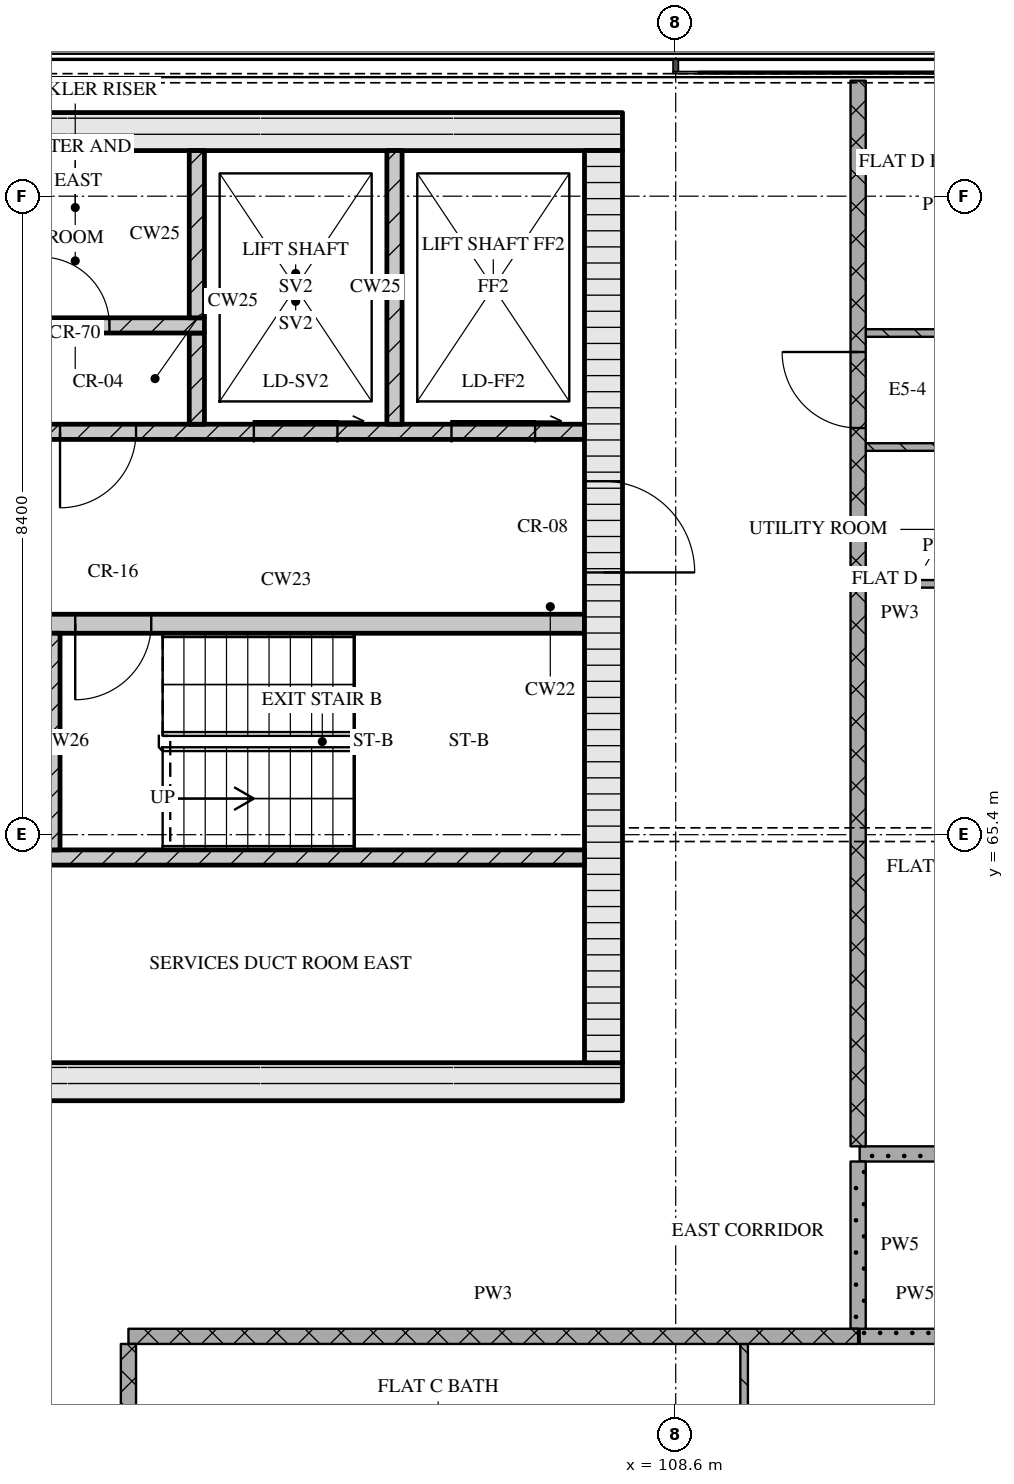
"""IFC4 building model, lengths in metres.
Left out: names, types, materials, properties, quantities, classifications, styles, units other than length and angle.
Written with IfcOpenShell. Run it as: python <this file> out.ifc"""

import sys

from ifc_helpers import new_model, si_unit, direction, frame, frame_2d, origin, place, context, subcontext, project, spatial, rectangle, extrude, element, fill, save


model = new_model("IFC4")
c1 = context("Model", 3, precision=1e-05, world=origin(), true_north=direction((0.0, 1.0)))
c2 = subcontext(c1, "Body", "Model", "MODEL_VIEW")
j1 = project(units=[si_unit("LENGTHUNIT", "METRE"), si_unit("PLANEANGLEUNIT", "RADIAN")], contexts=[c1])
p1 = place(None, origin())
s1 = spatial("IfcSite", under=j1, at=p1, CompositionType="ELEMENT")
p2 = place(p1, origin())
s2 = spatial("IfcBuilding", under=s1, at=p2, CompositionType="ELEMENT")
p3 = place(p2, frame((0.0, 0.0, 292.35)))
s3 = spatial("IfcBuildingStorey", under=s2, at=p3, CompositionType="ELEMENT", Elevation=292.35)
p4 = place(p3, frame((67.3, 62.15, 0.0), z_axis=(0.0, 0.0, 1.0), x_axis=(1.0, 0.0, 0.0)))
e1 = element("IfcWall", 1, at=p4, inside=s3, PredefinedType="SOLIDWALL", context=c2, shape_type="SweptSolid", body=[
    extrude(rectangle(XDim=40.6, YDim=0.5, at=frame_2d((20.3, 0.0))), origin(), (0.0, 0.0, 1.0), 3.32),
])
p5 = place(p4, frame((20.65, 0.0, 0.0)))
e2 = element("IfcOpeningElement", 2, at=p5, cuts=e1, PredefinedType="OPENING", context=c2, shape_type="SweptSolid", body=[
    extrude(rectangle(XDim=1.8, YDim=2.1, at=frame_2d((0.9, 1.05))), frame((0.0, 0.26, 0.0), z_axis=(0.0, -1.0, 0.0), x_axis=(1.0, 0.0, 0.0)), (0.0, 0.0, 1.0), 0.52),
])
p6 = place(p3, frame((67.3, 74.65, 0.0), z_axis=(0.0, 0.0, 1.0), x_axis=(1.0, 0.0, 0.0)))
e3 = element("IfcWall", 3, at=p6, inside=s3, PredefinedType="SOLIDWALL", context=c2, shape_type="SweptSolid", body=[
    extrude(rectangle(XDim=40.6, YDim=0.5, at=frame_2d((20.3, 0.0))), origin(), (0.0, 0.0, 1.0), 3.32),
])
p7 = place(p3, frame((107.65, 62.4, 0.0), z_axis=(0.0, 0.0, 1.0), x_axis=(0.0, 1.0, 0.0)))
e4 = element("IfcWall", 4, at=p7, inside=s3, PredefinedType="SOLIDWALL", context=c2, shape_type="SweptSolid", body=[
    extrude(rectangle(XDim=12.0, YDim=0.5, at=frame_2d((6.0, 0.0))), origin(), (0.0, 0.0, 1.0), 3.32),
])
p8 = place(p7, frame((6.45, 0.0, 0.0)))
e5 = element("IfcOpeningElement", 5, at=p8, cuts=e4, PredefinedType="OPENING", context=c2, shape_type="SweptSolid", body=[
    extrude(rectangle(XDim=1.2, YDim=2.1, at=frame_2d((0.6, 1.05))), frame((0.0, 0.26, 0.0), z_axis=(0.0, -1.0, 0.0), x_axis=(1.0, 0.0, 0.0)), (0.0, 0.0, 1.0), 0.52),
])
p9 = place(p3, frame((91.4, 65.1, 0.0), z_axis=(0.0, 0.0, 1.0), x_axis=(1.0, 0.0, 0.0)))
e6 = element("IfcWall", 6, at=p9, inside=s3, PredefinedType="SOLIDWALL", context=c2, shape_type="SweptSolid", body=[
    extrude(rectangle(XDim=16.0, YDim=0.2, at=frame_2d((8.0, 0.0))), origin(), (0.0, 0.0, 1.0), 3.32),
])
p10 = place(p9, frame((0.85, 0.0, 0.0)))
e7 = element("IfcOpeningElement", 7, at=p10, cuts=e6, PredefinedType="OPENING", context=c2, shape_type="SweptSolid", body=[
    extrude(rectangle(XDim=1.1, YDim=2.1, at=frame_2d((0.55, 1.05))), frame((0.0, 0.11, 0.0), z_axis=(0.0, -1.0, 0.0), x_axis=(1.0, 0.0, 0.0)), (0.0, 0.0, 1.0), 0.22),
])
p11 = place(p9, frame((3.35, 0.0, 0.0)))
e8 = element("IfcOpeningElement", 8, at=p11, cuts=e6, PredefinedType="OPENING", context=c2, shape_type="SweptSolid", body=[
    extrude(rectangle(XDim=1.1, YDim=2.1, at=frame_2d((0.55, 1.05))), frame((0.0, 0.11, 0.0), z_axis=(0.0, -1.0, 0.0), x_axis=(1.0, 0.0, 0.0)), (0.0, 0.0, 1.0), 0.22),
])
p12 = place(p9, frame((5.85, 0.0, 0.0)))
e9 = element("IfcOpeningElement", 9, at=p12, cuts=e6, PredefinedType="OPENING", context=c2, shape_type="SweptSolid", body=[
    extrude(rectangle(XDim=1.1, YDim=2.1, at=frame_2d((0.55, 1.05))), frame((0.0, 0.11, 0.0), z_axis=(0.0, -1.0, 0.0), x_axis=(1.0, 0.0, 0.0)), (0.0, 0.0, 1.0), 0.22),
])
p13 = place(p9, frame((7.83, 0.0, 0.0)))
e10 = element("IfcOpeningElement", 10, at=p13, cuts=e6, PredefinedType="OPENING", context=c2, shape_type="SweptSolid", body=[
    extrude(rectangle(XDim=0.9, YDim=2.1, at=frame_2d((0.45, 1.05))), frame((0.0, 0.11, 0.0), z_axis=(0.0, -1.0, 0.0), x_axis=(1.0, 0.0, 0.0)), (0.0, 0.0, 1.0), 0.22),
])
p14 = place(p3, frame((100.35, 65.2, 0.0), z_axis=(0.0, 0.0, 1.0), x_axis=(0.0, 1.0, 0.0)))
e11 = element("IfcWall", 11, at=p14, inside=s3, PredefinedType="SOLIDWALL", context=c2, shape_type="SweptSolid", body=[
    extrude(rectangle(XDim=2.85, YDim=0.3, at=frame_2d((1.425, 0.0))), origin(), (0.0, 0.0, 1.0), 3.32),
])
p15 = place(p3, frame((98.95, 68.175, 0.0), z_axis=(0.0, 0.0, 1.0), x_axis=(1.0, 0.0, 0.0)))
e12 = element("IfcWall", 12, at=p15, inside=s3, PredefinedType="SOLIDWALL", context=c2, shape_type="SweptSolid", body=[
    extrude(rectangle(XDim=8.45, YDim=0.25, at=frame_2d((4.225, 0.0))), origin(), (0.0, 0.0, 1.0), 3.32),
])
p16 = place(p15, frame((0.45, 0.0, 0.0)))
e13 = element("IfcOpeningElement", 13, at=p16, cuts=e12, PredefinedType="OPENING", context=c2, shape_type="SweptSolid", body=[
    extrude(rectangle(XDim=0.8, YDim=2.1, at=frame_2d((0.4, 1.05))), frame((0.0, 0.135, 0.0), z_axis=(0.0, -1.0, 0.0), x_axis=(1.0, 0.0, 0.0)), (0.0, 0.0, 1.0), 0.27),
])
p17 = place(p15, frame((1.75, 0.0, 0.0)))
e14 = element("IfcOpeningElement", 14, at=p17, cuts=e12, PredefinedType="OPENING", context=c2, shape_type="SweptSolid", body=[
    extrude(rectangle(XDim=1.0, YDim=2.1, at=frame_2d((0.5, 1.05))), frame((0.0, 0.135, 0.0), z_axis=(0.0, -1.0, 0.0), x_axis=(1.0, 0.0, 0.0)), (0.0, 0.0, 1.0), 0.27),
])
p18 = place(p3, frame((67.8, 70.7, 0.0), z_axis=(0.0, 0.0, 1.0), x_axis=(1.0, 0.0, 0.0)))
e15 = element("IfcWall", 15, at=p18, inside=s3, PredefinedType="SOLIDWALL", context=c2, shape_type="SweptSolid", body=[
    extrude(rectangle(XDim=39.6, YDim=0.2, at=frame_2d((19.8, 0.0))), origin(), (0.0, 0.0, 1.0), 3.32),
])
p19 = place(p18, frame((0.65, 0.0, 0.0)))
e16 = element("IfcOpeningElement", 16, at=p19, cuts=e15, PredefinedType="OPENING", context=c2, shape_type="SweptSolid", body=[
    extrude(rectangle(XDim=1.1, YDim=2.1, at=frame_2d((0.55, 1.05))), frame((0.0, 0.11, 0.0), z_axis=(0.0, -1.0, 0.0), x_axis=(1.0, 0.0, 0.0)), (0.0, 0.0, 1.0), 0.22),
])
p20 = place(p18, frame((3.25, 0.0, 0.0)))
e17 = element("IfcOpeningElement", 17, at=p20, cuts=e15, PredefinedType="OPENING", context=c2, shape_type="SweptSolid", body=[
    extrude(rectangle(XDim=1.1, YDim=2.1, at=frame_2d((0.55, 1.05))), frame((0.0, 0.11, 0.0), z_axis=(0.0, -1.0, 0.0), x_axis=(1.0, 0.0, 0.0)), (0.0, 0.0, 1.0), 0.22),
])
p21 = place(p18, frame((5.9, 0.0, 0.0)))
e18 = element("IfcOpeningElement", 18, at=p21, cuts=e15, PredefinedType="OPENING", context=c2, shape_type="SweptSolid", body=[
    extrude(rectangle(XDim=1.0, YDim=2.1, at=frame_2d((0.5, 1.05))), frame((0.0, 0.11, 0.0), z_axis=(0.0, -1.0, 0.0), x_axis=(1.0, 0.0, 0.0)), (0.0, 0.0, 1.0), 0.22),
])
p22 = place(p18, frame((21.7, 0.0, 0.0)))
e19 = element("IfcOpeningElement", 19, at=p22, cuts=e15, PredefinedType="OPENING", context=c2, shape_type="SweptSolid", body=[
    extrude(rectangle(XDim=1.0, YDim=2.1, at=frame_2d((0.5, 1.05))), frame((0.0, 0.11, 0.0), z_axis=(0.0, -1.0, 0.0), x_axis=(1.0, 0.0, 0.0)), (0.0, 0.0, 1.0), 0.22),
])
p23 = place(p18, frame((32.7, 0.0, 0.0)))
e20 = element("IfcOpeningElement", 20, at=p23, cuts=e15, PredefinedType="OPENING", context=c2, shape_type="SweptSolid", body=[
    extrude(rectangle(XDim=1.0, YDim=2.1, at=frame_2d((0.5, 1.05))), frame((0.0, 0.11, 0.0), z_axis=(0.0, -1.0, 0.0), x_axis=(1.0, 0.0, 0.0)), (0.0, 0.0, 1.0), 0.22),
])
p24 = place(p18, frame((35.25, 0.0, 0.0)))
e21 = element("IfcOpeningElement", 21, at=p24, cuts=e15, PredefinedType="OPENING", context=c2, shape_type="SweptSolid", body=[
    extrude(rectangle(XDim=1.1, YDim=2.1, at=frame_2d((0.55, 1.05))), frame((0.0, 0.11, 0.0), z_axis=(0.0, -1.0, 0.0), x_axis=(1.0, 0.0, 0.0)), (0.0, 0.0, 1.0), 0.22),
])
p25 = place(p18, frame((37.85, 0.0, 0.0)))
e22 = element("IfcOpeningElement", 22, at=p25, cuts=e15, PredefinedType="OPENING", context=c2, shape_type="SweptSolid", body=[
    extrude(rectangle(XDim=1.1, YDim=2.1, at=frame_2d((0.55, 1.05))), frame((0.0, 0.11, 0.0), z_axis=(0.0, -1.0, 0.0), x_axis=(1.0, 0.0, 0.0)), (0.0, 0.0, 1.0), 0.22),
])
p26 = place(p3, frame((102.3, 70.8, 0.0), z_axis=(0.0, 0.0, 1.0), x_axis=(0.0, 1.0, 0.0)))
e23 = element("IfcWall", 23, at=p26, inside=s3, PredefinedType="SOLIDWALL", context=c2, shape_type="SweptSolid", body=[
    extrude(rectangle(XDim=1.2, YDim=0.2, at=frame_2d((0.6, 0.0))), origin(), (0.0, 0.0, 1.0), 3.32),
])
p27 = place(p3, frame((104.9, 70.8, 0.0), z_axis=(0.0, 0.0, 1.0), x_axis=(0.0, 1.0, 0.0)))
e24 = element("IfcWall", 24, at=p27, inside=s3, PredefinedType="SOLIDWALL", context=c2, shape_type="SweptSolid", body=[
    extrude(rectangle(XDim=3.6, YDim=0.2, at=frame_2d((1.8, 0.0))), origin(), (0.0, 0.0, 1.0), 3.32),
])
p28 = place(p3, frame((96.68, 72.1, 0.0), z_axis=(0.0, 0.0, 1.0), x_axis=(1.0, 0.0, 0.0)))
e25 = element("IfcWall", 25, at=p28, inside=s3, PredefinedType="SOLIDWALL", context=c2, shape_type="SweptSolid", body=[
    extrude(rectangle(XDim=5.72, YDim=0.2, at=frame_2d((2.86, 0.0))), origin(), (0.0, 0.0, 1.0), 3.32),
])
p29 = place(p28, frame((0.77, 0.0, 0.0)))
e26 = element("IfcOpeningElement", 26, at=p29, cuts=e25, PredefinedType="OPENING", context=c2, shape_type="SweptSolid", body=[
    extrude(rectangle(XDim=0.9, YDim=2.1, at=frame_2d((0.45, 1.05))), frame((0.0, 0.11, 0.0), z_axis=(0.0, -1.0, 0.0), x_axis=(1.0, 0.0, 0.0)), (0.0, 0.0, 1.0), 0.22),
])
p30 = place(p28, frame((3.57, 0.0, 0.0)))
e27 = element("IfcOpeningElement", 27, at=p30, cuts=e25, PredefinedType="OPENING", context=c2, shape_type="SweptSolid", body=[
    extrude(rectangle(XDim=0.9, YDim=2.1, at=frame_2d((0.45, 1.05))), frame((0.0, 0.11, 0.0), z_axis=(0.0, -1.0, 0.0), x_axis=(1.0, 0.0, 0.0)), (0.0, 0.0, 1.0), 0.22),
])
p31 = place(p3, frame((102.3, 72.2, 0.0), z_axis=(0.0, 0.0, 1.0), x_axis=(0.0, 1.0, 0.0)))
e28 = element("IfcWall", 28, at=p31, inside=s3, PredefinedType="SOLIDWALL", context=c2, shape_type="SweptSolid", body=[
    extrude(rectangle(XDim=2.2, YDim=0.2, at=frame_2d((1.1, 0.0))), origin(), (0.0, 0.0, 1.0), 3.32),
])
p32 = place(p3, frame((101.4, 58.8, 0.0), z_axis=(0.0, 0.0, 1.0), x_axis=(1.0, 0.0, 0.0)))
e29 = element("IfcWall", 29, at=p32, inside=s3, PredefinedType="PARTITIONING", context=c2, shape_type="SweptSolid", body=[
    extrude(rectangle(XDim=9.6, YDim=0.2, at=frame_2d((4.8, 0.0))), origin(), (0.0, 0.0, 1.0), 3.32),
])
p33 = place(p3, frame((111.02, 58.8, 0.0), z_axis=(0.0, 0.0, 1.0), x_axis=(1.0, 0.0, 0.0)))
e30 = element("IfcWall", 30, at=p33, inside=s3, PredefinedType="PARTITIONING", context=c2, shape_type="SweptSolid", body=[
    extrude(rectangle(XDim=1.46, YDim=0.2, at=frame_2d((0.73, 0.0))), origin(), (0.0, 0.0, 1.0), 3.32),
])
p34 = place(p3, frame((111.02, 61.2, 0.0), z_axis=(0.0, 0.0, 1.0), x_axis=(1.0, 0.0, 0.0)))
e31 = element("IfcWall", 31, at=p34, inside=s3, PredefinedType="PARTITIONING", context=c2, shape_type="SweptSolid", body=[
    extrude(rectangle(XDim=2.66, YDim=0.2, at=frame_2d((1.33, 0.0))), origin(), (0.0, 0.0, 1.0), 3.32),
])
for number, where, z_axis, x_axis in (
    (32, (111.1, 68.7, 0.0), (0.0, 0.0, 1.0), (1.0, 0.0, 0.0)),
    (33, (111.1, 70.5, 0.0), (0.0, 0.0, 1.0), (1.0, 0.0, 0.0)),
    (34, (111.1, 72.0, 0.0), (0.0, 0.0, 1.0), (1.0, 0.0, 0.0)),
):
    element("IfcWall", number, at=place(p3, frame(where, z_axis=z_axis, x_axis=x_axis)), inside=s3, PredefinedType="PARTITIONING", context=c2, shape_type="SweptSolid", body=[
        extrude(rectangle(XDim=2.6, YDim=0.1, at=frame_2d((1.3, 0.0))), origin(), (0.0, 0.0, 1.0), 3.32),
    ])
p35 = place(p3, frame((101.4, 58.7, 0.0), z_axis=(0.0, 0.0, 1.0), x_axis=(0.0, -1.0, 0.0)))
e35 = element("IfcWall", 35, at=p35, inside=s3, PredefinedType="PARTITIONING", context=c2, shape_type="SweptSolid", body=[
    extrude(rectangle(XDim=8.0, YDim=0.2, at=frame_2d((4.0, 0.0))), origin(), (0.0, 0.0, 1.0), 3.32),
])
p36 = place(p35, frame((2.55, 0.0, 0.0)))
e36 = element("IfcOpeningElement", 36, at=p36, cuts=e35, PredefinedType="OPENING", context=c2, shape_type="SweptSolid", body=[
    extrude(rectangle(XDim=1.0, YDim=2.1, at=frame_2d((0.5, 1.05))), frame((0.0, 0.11, 0.0), z_axis=(0.0, -1.0, 0.0), x_axis=(1.0, 0.0, 0.0)), (0.0, 0.0, 1.0), 0.22),
])
p37 = place(p3, frame((109.5, 58.7, 0.0), z_axis=(0.0, 0.0, 1.0), x_axis=(0.0, -1.0, 0.0)))
e37 = element("IfcWall", 37, at=p37, inside=s3, PredefinedType="PARTITIONING", context=c2, shape_type="SweptSolid", body=[
    extrude(rectangle(XDim=2.25, YDim=0.1, at=frame_2d((1.125, 0.0))), origin(), (0.0, 0.0, 1.0), 3.32),
])
p38 = place(p3, frame((111.0, 75.32, 0.0), z_axis=(0.0, 0.0, 1.0), x_axis=(0.0, -1.0, 0.0)))
e38 = element("IfcWall", 38, at=p38, inside=s3, PredefinedType="PARTITIONING", context=c2, shape_type="SweptSolid", body=[
    extrude(rectangle(XDim=14.02, YDim=0.2, at=frame_2d((7.01, 0.0))), origin(), (0.0, 0.0, 1.0), 3.32),
])
p39 = place(p38, frame((3.57, 0.0, 0.0)))
e39 = element("IfcOpeningElement", 39, at=p39, cuts=e38, PredefinedType="OPENING", context=c2, shape_type="SweptSolid", body=[
    extrude(rectangle(XDim=1.0, YDim=2.1, at=frame_2d((0.5, 1.05))), frame((0.0, 0.11, 0.0), z_axis=(0.0, -1.0, 0.0), x_axis=(1.0, 0.0, 0.0)), (0.0, 0.0, 1.0), 0.22),
])
p40 = place(p3, frame((111.0, 61.1, 0.0), z_axis=(0.0, 0.0, 1.0), x_axis=(0.0, -1.0, 0.0)))
e40 = element("IfcWall", 40, at=p40, inside=s3, PredefinedType="PARTITIONING", context=c2, shape_type="SweptSolid", body=[
    extrude(rectangle(XDim=2.2, YDim=0.2, at=frame_2d((1.1, 0.0))), origin(), (0.0, 0.0, 1.0), 3.32),
])
p41 = place(p17, origin())
e41 = element("IfcDoor", 41, at=p41, inside=s3, OperationType="SINGLE_SWING_RIGHT", PredefinedType="DOOR", context=c2, shape_type="SweptSolid", body=[
    extrude(rectangle(XDim=1.0, YDim=2.1, at=frame_2d((0.5, 1.05))), frame((0.0, 0.025, 0.0), z_axis=(0.0, -1.0, 0.0), x_axis=(1.0, 0.0, 0.0)), (0.0, 0.0, 1.0), 0.05),
])
fill(e14, e41)
p42 = place(p8, origin())
e42 = element("IfcDoor", 42, at=p42, inside=s3, OperationType="SINGLE_SWING_RIGHT", PredefinedType="DOOR", context=c2, shape_type="SweptSolid", body=[
    extrude(rectangle(XDim=1.2, YDim=2.1, at=frame_2d((0.6, 1.05))), frame((0.0, 0.025, 0.0), z_axis=(0.0, -1.0, 0.0), x_axis=(1.0, 0.0, 0.0)), (0.0, 0.0, 1.0), 0.05),
])
fill(e5, e42)
p43 = place(p23, origin())
e43 = element("IfcDoor", 43, at=p43, inside=s3, OperationType="SINGLE_SWING_RIGHT", PredefinedType="DOOR", context=c2, shape_type="SweptSolid", body=[
    extrude(rectangle(XDim=1.0, YDim=2.1, at=frame_2d((0.5, 1.05))), frame((0.0, 0.025, 0.0), z_axis=(0.0, -1.0, 0.0), x_axis=(1.0, 0.0, 0.0)), (0.0, 0.0, 1.0), 0.05),
])
fill(e20, e43)
p44 = place(p24, origin())
e44 = element("IfcDoor", 44, at=p44, inside=s3, OperationType="SLIDING_TO_RIGHT", PredefinedType="DOOR", context=c2, shape_type="SweptSolid", body=[
    extrude(rectangle(XDim=1.1, YDim=2.1, at=frame_2d((0.55, 1.05))), frame((0.0, 0.025, 0.0), z_axis=(0.0, -1.0, 0.0), x_axis=(1.0, 0.0, 0.0)), (0.0, 0.0, 1.0), 0.05),
])
fill(e21, e44)
p45 = place(p25, origin())
e45 = element("IfcDoor", 45, at=p45, inside=s3, OperationType="SLIDING_TO_RIGHT", PredefinedType="DOOR", context=c2, shape_type="SweptSolid", body=[
    extrude(rectangle(XDim=1.1, YDim=2.1, at=frame_2d((0.55, 1.05))), frame((0.0, 0.025, 0.0), z_axis=(0.0, -1.0, 0.0), x_axis=(1.0, 0.0, 0.0)), (0.0, 0.0, 1.0), 0.05),
])
fill(e22, e45)
p46 = place(p30, origin())
e46 = element("IfcDoor", 46, at=p46, inside=s3, OperationType="SINGLE_SWING_LEFT", PredefinedType="DOOR", context=c2, shape_type="SweptSolid", body=[
    extrude(rectangle(XDim=0.9, YDim=2.1, at=frame_2d((0.45, 1.05))), frame((0.0, 0.025, 0.0), z_axis=(0.0, -1.0, 0.0), x_axis=(1.0, 0.0, 0.0)), (0.0, 0.0, 1.0), 0.05),
])
fill(e27, e46)
p47 = place(p39, origin())
e47 = element("IfcDoor", 47, at=p47, inside=s3, OperationType="SINGLE_SWING_RIGHT", PredefinedType="DOOR", context=c2, shape_type="SweptSolid", body=[
    extrude(rectangle(XDim=1.0, YDim=2.1, at=frame_2d((0.5, 1.05))), frame((0.0, 0.025, 0.0), z_axis=(0.0, -1.0, 0.0), x_axis=(1.0, 0.0, 0.0)), (0.0, 0.0, 1.0), 0.05),
])
fill(e39, e47)
save(model, sys.argv[1])
